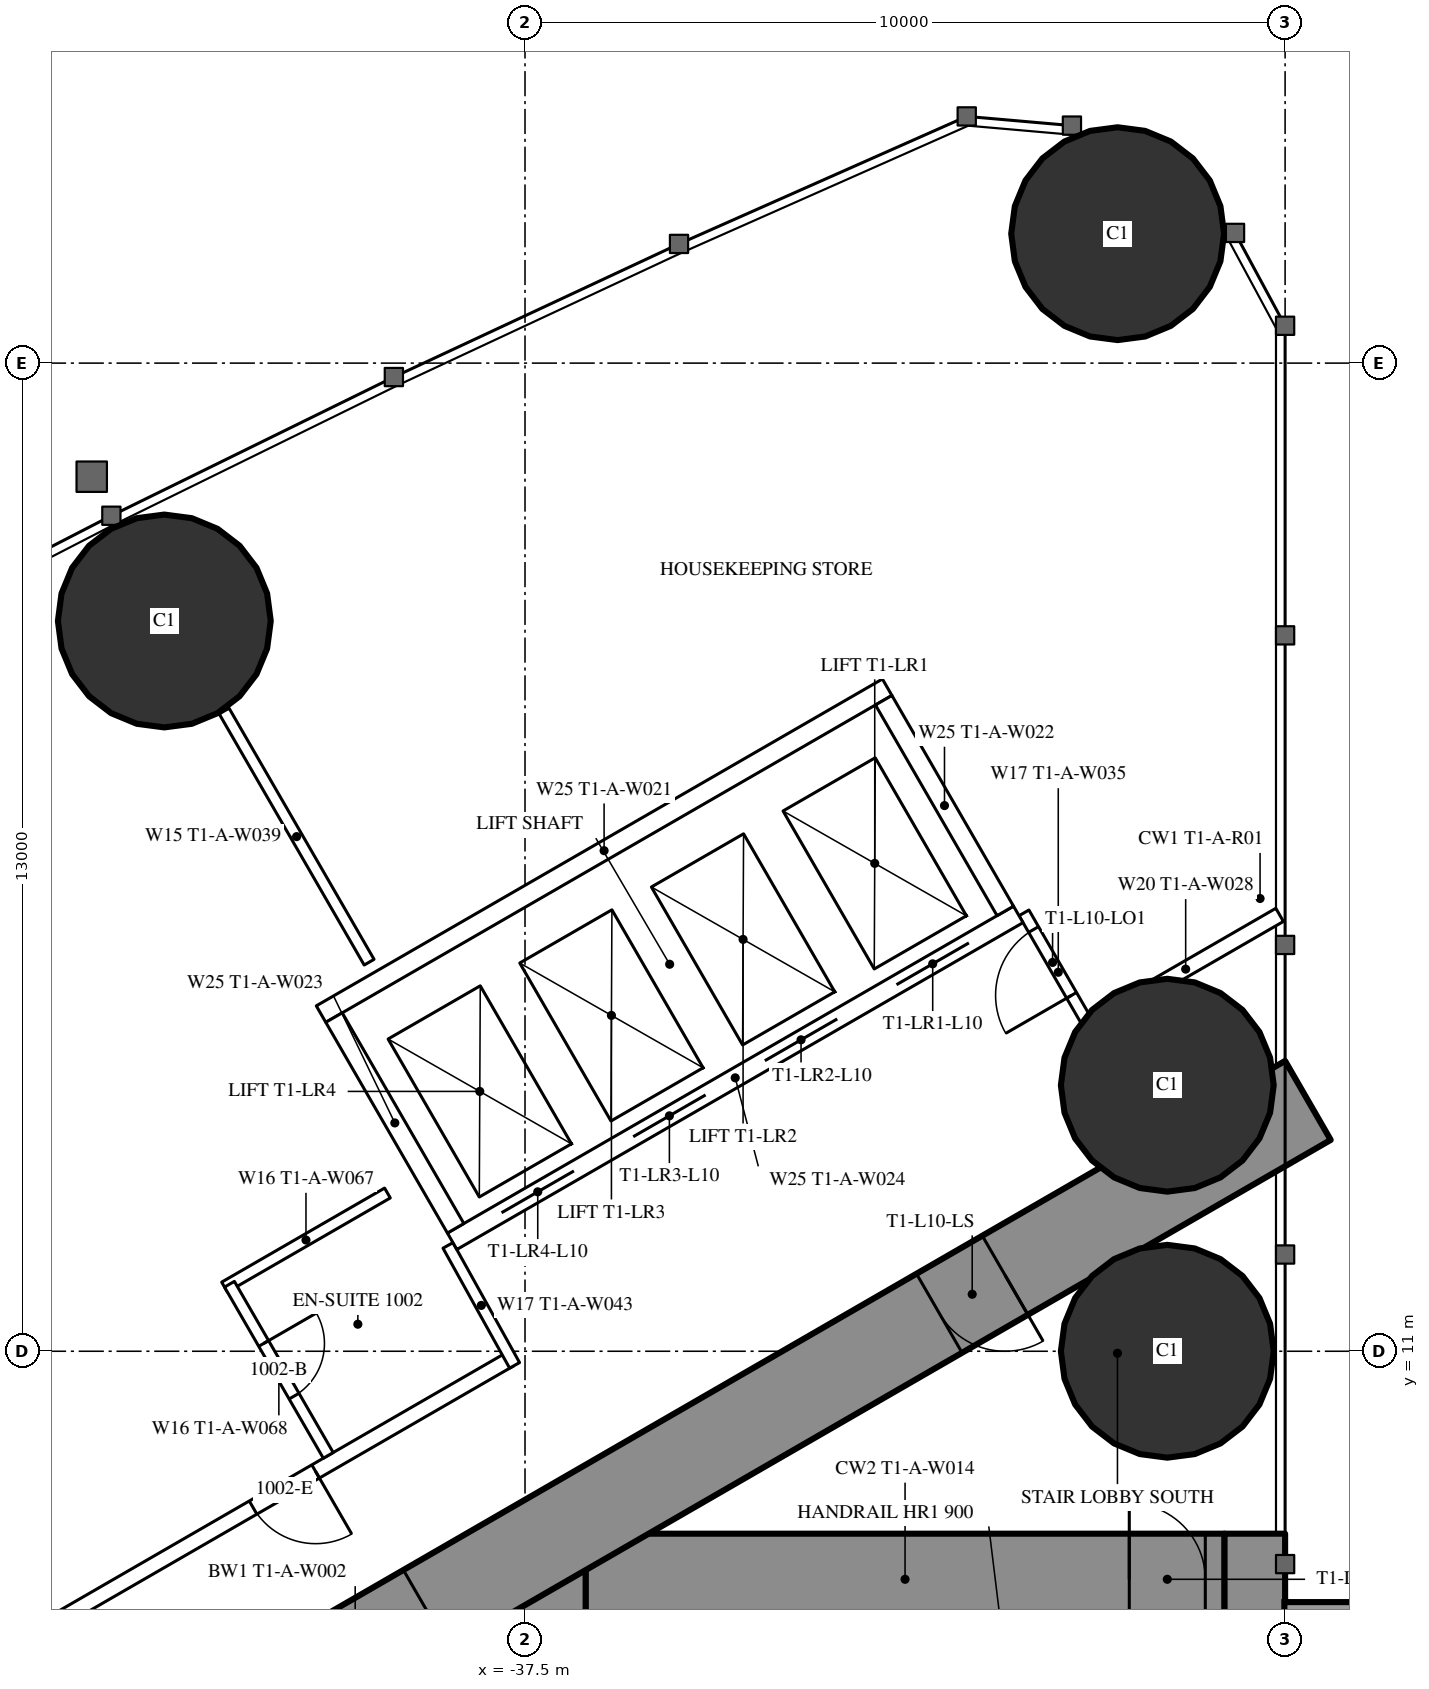
"""IFC4 building model, lengths in metres.
Left out: names, types, materials, properties, quantities, classifications, styles, units other than length and angle.
Written with IfcOpenShell. Run it as: python <this file> out.ifc"""

import sys

from ifc_helpers import new_model, si_unit, direction, frame, frame_2d, origin, origin_2d, place, context, subcontext, project, spatial, rectangle, hollow_circle, extrude, element, fill, save


model = new_model("IFC4")
c1 = context("Model", 3, precision=1e-05, world=origin(), true_north=direction((0.0, 1.0)))
c2 = subcontext(c1, "Body", "Model", "MODEL_VIEW")
j1 = project(units=[si_unit("LENGTHUNIT", "METRE"), si_unit("PLANEANGLEUNIT", "RADIAN")], contexts=[c1])
p1 = place(None, origin())
s1 = spatial("IfcSite", under=j1, at=p1, CompositionType="ELEMENT")
p2 = place(p1, origin())
s2 = spatial("IfcBuilding", under=s1, at=p2, CompositionType="ELEMENT")
p3 = place(p2, frame((0.0, 0.0, 42.5)))
s3 = spatial("IfcBuildingStorey", under=s2, at=p3, CompositionType="ELEMENT", Elevation=42.5)
for number, where, z_axis, x_axis in (
    (1, (-29.703, 25.703, 0.0), (0.0, 0.0, 1.0), (1.0, 0.0, 0.0)),
    (2, (-29.05, 11.0, 0.0), (0.0, 0.0, 1.0), (1.0, 0.0, 0.0)),
    (3, (-29.05, 14.5, 0.0), (0.0, 0.0, 1.0), (1.0, 0.0, 0.0)),
    (4, (-42.245, 20.607, 0.0), (0.0, 0.0, 1.0), (1.0, 0.0, 0.0)),
):
    element("IfcColumn", number, at=place(p3, frame(where, z_axis=z_axis, x_axis=x_axis)), inside=s3, PredefinedType="COLUMN", context=c2, shape_type="SweptSolid", body=[
        extrude(hollow_circle(Radius=1.4, WallThickness=0.12, at=origin_2d()), origin(), (0.0, 0.0, 1.0), 3.5),
    ])
p4 = place(p3, frame((-27.9, 8.6, 0.0), z_axis=(0.0, 0.0, 1.0), x_axis=(0.0, -1.0, 0.0)))
e5 = element("IfcWall", 5, at=p4, inside=s3, PredefinedType="SHEAR", context=c2, shape_type="SweptSolid", body=[
    extrude(rectangle(XDim=17.2, YDim=0.8, at=frame_2d((8.6, 0.0))), origin(), (0.0, 0.0, 1.0), 3.5),
])
p5 = place(p4, frame((2.45, 0.0, 0.6)))
e6 = element("IfcOpeningElement", 6, at=p5, cuts=e5, PredefinedType="OPENING", context=c2, shape_type="SweptSolid", body=[
    extrude(rectangle(XDim=0.6, YDim=2.1, at=frame_2d((0.3, 1.05))), frame((0.0, 0.41, 0.0), z_axis=(0.0, -1.0, 0.0), x_axis=(1.0, 0.0, 0.0)), (0.0, 0.0, 1.0), 0.82),
])
p6 = place(p4, frame((14.15, 0.0, 0.6)))
e7 = element("IfcOpeningElement", 7, at=p6, cuts=e5, PredefinedType="OPENING", context=c2, shape_type="SweptSolid", body=[
    extrude(rectangle(XDim=0.6, YDim=2.1, at=frame_2d((0.3, 1.05))), frame((0.0, 0.41, 0.0), z_axis=(0.0, -1.0, 0.0), x_axis=(1.0, 0.0, 0.0)), (0.0, 0.0, 1.0), 0.82),
])
p7 = place(p3, frame((-37.3, 8.6, 0.0), z_axis=(0.0, 0.0, 1.0), x_axis=(0.0, -1.0, 0.0)))
e8 = element("IfcWall", 8, at=p7, inside=s3, PredefinedType="SHEAR", context=c2, shape_type="SweptSolid", body=[
    extrude(rectangle(XDim=17.2, YDim=1.2, at=frame_2d((8.6, 0.0))), origin(), (0.0, 0.0, 1.0), 3.5),
])
p8 = place(p7, frame((7.7, 0.0, 0.0)))
e9 = element("IfcOpeningElement", 9, at=p8, cuts=e8, PredefinedType="OPENING", context=c2, shape_type="SweptSolid", body=[
    extrude(rectangle(XDim=1.8, YDim=2.2, at=frame_2d((0.9, 1.1))), frame((0.0, 0.61, 0.0), z_axis=(0.0, -1.0, 0.0), x_axis=(1.0, 0.0, 0.0)), (0.0, 0.0, 1.0), 1.22),
])
p9 = place(p3, frame((-28.3, 8.0, 0.0), z_axis=(0.0, 0.0, 1.0), x_axis=(-1.0, 0.0, 0.0)))
e10 = element("IfcWall", 10, at=p9, inside=s3, PredefinedType="SHEAR", context=c2, shape_type="SweptSolid", body=[
    extrude(rectangle(XDim=8.4, YDim=1.2, at=frame_2d((4.2, 0.0))), origin(), (0.0, 0.0, 1.0), 3.5),
])
p10 = place(p9, frame((0.25, 0.0, 0.0)))
e11 = element("IfcOpeningElement", 11, at=p10, cuts=e10, PredefinedType="OPENING", context=c2, shape_type="SweptSolid", body=[
    extrude(rectangle(XDim=1.0, YDim=2.2, at=frame_2d((0.5, 1.1))), frame((0.0, 0.61, 0.0), z_axis=(0.0, -1.0, 0.0), x_axis=(1.0, 0.0, 0.0)), (0.0, 0.0, 1.0), 1.22),
])
p11 = place(p3, frame((-27.2, 14.3, 0.0), z_axis=(0.0, 0.0, 1.0), x_axis=(-0.866026593062, -0.499997940104, 0.0)))
e12 = element("IfcWall", 12, at=p11, inside=s3, PredefinedType="SHEAR", context=c2, shape_type="SweptSolid", body=[
    extrude(rectangle(XDim=28.946, YDim=1.2, at=frame_2d((14.473, 0.0))), origin(), (0.0, 0.0, 1.0), 3.5),
])
p12 = place(p11, frame((4.6, 0.0, 0.0)))
e13 = element("IfcOpeningElement", 13, at=p12, cuts=e12, PredefinedType="OPENING", context=c2, shape_type="SweptSolid", body=[
    extrude(rectangle(XDim=1.0, YDim=2.2, at=frame_2d((0.5, 1.1))), frame((0.0, 0.61, 0.0), z_axis=(0.0, -1.0, 0.0), x_axis=(1.0, 0.0, 0.0)), (0.0, 0.0, 1.0), 1.22),
])
p13 = place(p11, frame((13.395, 0.0, 0.0)))
e14 = element("IfcOpeningElement", 14, at=p13, cuts=e12, PredefinedType="OPENING", context=c2, shape_type="SweptSolid", body=[
    extrude(rectangle(XDim=1.8, YDim=2.2, at=frame_2d((0.9, 1.1))), frame((0.0, 0.61, 0.0), z_axis=(0.0, -1.0, 0.0), x_axis=(1.0, 0.0, 0.0)), (0.0, 0.0, 1.0), 1.22),
])
p14 = place(p3, frame((-39.551, 16.119, 0.0), z_axis=(0.0, 0.0, 1.0), x_axis=(-0.500014214979, 0.866017196607, 0.0)))
e15 = element("IfcWall", 15, at=p14, inside=s3, PredefinedType="PARTITIONING", context=c2, shape_type="SweptSolid", body=[
    extrude(rectangle(XDim=3.815, YDim=0.15, at=frame_2d((1.907, 0.0))), origin(), (0.0, 0.0, 1.0), 3.25),
])
p15 = place(p3, frame((-27.572, 16.741, 0.0), z_axis=(0.0, 0.0, 1.0), x_axis=(-0.866034618596, -0.499984039138, 0.0)))
e16 = element("IfcWall", 16, at=p15, inside=s3, PredefinedType="PARTITIONING", context=c2, shape_type="SweptSolid", body=[
    extrude(rectangle(XDim=2.854, YDim=0.2, at=frame_2d((1.427, 0.0))), origin(), (0.0, 0.0, 1.0), 3.25),
])
p16 = place(p3, frame((-37.7, 10.894, 0.0), z_axis=(0.0, 0.0, 1.0), x_axis=(-0.866027905338, -0.499995667157, 0.0)))
e17 = element("IfcWall", 17, at=p16, inside=s3, PredefinedType="PARTITIONING", context=c2, shape_type="SweptSolid", body=[
    extrude(rectangle(XDim=21.787, YDim=0.2, at=frame_2d((10.894, 0.0))), origin(), (0.0, 0.0, 1.0), 3.25),
])
p17 = place(p16, frame((11.78, 0.0, 0.0)))
e18 = element("IfcOpeningElement", 18, at=p17, cuts=e17, PredefinedType="OPENING", context=c2, shape_type="SweptSolid", body=[
    extrude(rectangle(XDim=0.95, YDim=2.2, at=frame_2d((0.475, 1.1))), frame((0.0, 0.11, 0.0), z_axis=(0.0, -1.0, 0.0), x_axis=(1.0, 0.0, 0.0)), (0.0, 0.0, 1.0), 0.22),
])
p18 = place(p16, frame((2.95, 0.0, 0.0)))
e19 = element("IfcOpeningElement", 19, at=p18, cuts=e17, PredefinedType="OPENING", context=c2, shape_type="SweptSolid", body=[
    extrude(rectangle(XDim=0.95, YDim=2.2, at=frame_2d((0.475, 1.1))), frame((0.0, 0.11, 0.0), z_axis=(0.0, -1.0, 0.0), x_axis=(1.0, 0.0, 0.0)), (0.0, 0.0, 1.0), 0.22),
])
p19 = place(p3, frame((-38.513, 12.392, 0.0), z_axis=(0.0, 0.0, 1.0), x_axis=(0.485585508183, -0.874189175317, 0.0)))
e20 = element("IfcWall", 20, at=p19, inside=s3, PredefinedType="PARTITIONING", context=c2, shape_type="SweptSolid", body=[
    extrude(rectangle(XDim=1.805, YDim=0.15, at=frame_2d((0.902, 0.0))), origin(), (0.0, 0.0, 1.0), 3.25),
])
p20 = place(p3, frame((-30.033, 15.205, 0.0), z_axis=(0.0, 0.0, 1.0), x_axis=(-0.499980071345, 0.866036909293, 0.0)))
e21 = element("IfcWall", 21, at=p20, inside=s3, PredefinedType="PARTITIONING", context=c2, shape_type="SweptSolid", body=[
    extrude(rectangle(XDim=1.805, YDim=0.15, at=frame_2d((0.902, 0.0))), origin(), (0.0, 0.0, 1.0), 3.25),
])
p21 = place(p20, frame((0.552, 0.0, 0.0)))
e22 = element("IfcOpeningElement", 22, at=p21, cuts=e21, PredefinedType="OPENING", context=c2, shape_type="SweptSolid", body=[
    extrude(rectangle(XDim=1.0, YDim=2.2, at=frame_2d((0.5, 1.1))), frame((0.0, 0.085, 0.0), z_axis=(0.0, -1.0, 0.0), x_axis=(1.0, 0.0, 0.0)), (0.0, 0.0, 1.0), 0.17),
])
p22 = place(p3, frame((-39.31, 13.082, 0.0), z_axis=(0.0, 0.0, 1.0), x_axis=(-0.866031185235, -0.4999899861, 0.0)))
e23 = element("IfcWall", 23, at=p22, inside=s3, PredefinedType="PARTITIONING", context=c2, shape_type="SweptSolid", body=[
    extrude(rectangle(XDim=2.475, YDim=0.15, at=frame_2d((1.238, 0.0))), origin(), (0.0, 0.0, 1.0), 3.25),
])
p23 = place(p3, frame((-40.088, 9.63, 0.0), z_axis=(0.0, 0.0, 1.0), x_axis=(-0.500006934395, 0.866021400173, 0.0)))
e24 = element("IfcWall", 24, at=p23, inside=s3, PredefinedType="PARTITIONING", context=c2, shape_type="SweptSolid", body=[
    extrude(rectangle(XDim=2.6, YDim=0.15, at=frame_2d((1.3, 0.0))), origin(), (0.0, 0.0, 1.0), 3.25),
])
p24 = place(p23, frame((0.9, 0.0, 0.0)))
e25 = element("IfcOpeningElement", 25, at=p24, cuts=e24, PredefinedType="OPENING", context=c2, shape_type="SweptSolid", body=[
    extrude(rectangle(XDim=0.8, YDim=2.2, at=frame_2d((0.4, 1.1))), frame((0.0, 0.085, 0.0), z_axis=(0.0, -1.0, 0.0), x_axis=(1.0, 0.0, 0.0)), (0.0, 0.0, 1.0), 0.17),
])
p25 = place(p3, frame((-31.01, 16.747, 0.0), z_axis=(0.0, 0.0, 1.0), x_axis=(-0.866028165386, -0.499995216735, 0.0)))
e26 = element("IfcWall", 26, at=p25, inside=s3, PredefinedType="PARTITIONING", context=c2, shape_type="SweptSolid", body=[
    extrude(rectangle(XDim=8.6, YDim=0.25, at=frame_2d((4.3, 0.0))), origin(), (0.0, 0.0, 1.0), 3.25),
])
p26 = place(p25, frame((0.75, 0.0, 0.0)))
e27 = element("IfcOpeningElement", 27, at=p26, cuts=e26, PredefinedType="OPENING", context=c2, shape_type="SweptSolid", body=[
    extrude(rectangle(XDim=1.1, YDim=2.2, at=frame_2d((0.55, 1.1))), frame((0.0, 0.135, 0.0), z_axis=(0.0, -1.0, 0.0), x_axis=(1.0, 0.0, 0.0)), (0.0, 0.0, 1.0), 0.27),
])
p27 = place(p25, frame((2.75, 0.0, 0.0)))
e28 = element("IfcOpeningElement", 28, at=p27, cuts=e26, PredefinedType="OPENING", context=c2, shape_type="SweptSolid", body=[
    extrude(rectangle(XDim=1.1, YDim=2.2, at=frame_2d((0.55, 1.1))), frame((0.0, 0.135, 0.0), z_axis=(0.0, -1.0, 0.0), x_axis=(1.0, 0.0, 0.0)), (0.0, 0.0, 1.0), 0.27),
])
p28 = place(p25, frame((4.75, 0.0, 0.0)))
e29 = element("IfcOpeningElement", 29, at=p28, cuts=e26, PredefinedType="OPENING", context=c2, shape_type="SweptSolid", body=[
    extrude(rectangle(XDim=1.1, YDim=2.2, at=frame_2d((0.55, 1.1))), frame((0.0, 0.135, 0.0), z_axis=(0.0, -1.0, 0.0), x_axis=(1.0, 0.0, 0.0)), (0.0, 0.0, 1.0), 0.27),
])
p29 = place(p25, frame((6.75, 0.0, 0.0)))
e30 = element("IfcOpeningElement", 30, at=p29, cuts=e26, PredefinedType="OPENING", context=c2, shape_type="SweptSolid", body=[
    extrude(rectangle(XDim=1.1, YDim=2.2, at=frame_2d((0.55, 1.1))), frame((0.0, 0.135, 0.0), z_axis=(0.0, -1.0, 0.0), x_axis=(1.0, 0.0, 0.0)), (0.0, 0.0, 1.0), 0.27),
])
p30 = place(p3, frame((-32.736, 19.736, 0.0), z_axis=(0.0, 0.0, 1.0), x_axis=(-0.866028165386, -0.499995216735, 0.0)))
e31 = element("IfcWall", 31, at=p30, inside=s3, PredefinedType="PARTITIONING", context=c2, shape_type="SweptSolid", body=[
    extrude(rectangle(XDim=8.6, YDim=0.25, at=frame_2d((4.3, 0.0))), origin(), (0.0, 0.0, 1.0), 3.25),
])
p31 = place(p3, frame((-31.181, 16.793, 0.0), z_axis=(0.0, 0.0, 1.0), x_axis=(-0.499929347863, 0.866066190972, 0.0)))
e32 = element("IfcWall", 32, at=p31, inside=s3, PredefinedType="PARTITIONING", context=c2, shape_type="SweptSolid", body=[
    extrude(rectangle(XDim=3.201, YDim=0.25, at=frame_2d((1.6, 0.0))), origin(), (0.0, 0.0, 1.0), 3.25),
])
p32 = place(p3, frame((-38.413, 12.618, 0.0), z_axis=(0.0, 0.0, 1.0), x_axis=(-0.499872130319, 0.866099216793, 0.0)))
e33 = element("IfcWall", 33, at=p32, inside=s3, PredefinedType="PARTITIONING", context=c2, shape_type="SweptSolid", body=[
    extrude(rectangle(XDim=3.2, YDim=0.25, at=frame_2d((1.6, 0.0))), origin(), (0.0, 0.0, 1.0), 3.25),
])
p33 = place(p24, origin())
e34 = element("IfcDoor", 34, at=p33, inside=s3, OperationType="SINGLE_SWING_RIGHT", PredefinedType="DOOR", context=c2, shape_type="SweptSolid", body=[
    extrude(rectangle(XDim=0.8, YDim=2.2, at=frame_2d((0.4, 1.1))), frame((0.0, 0.025, 0.0), z_axis=(0.0, -1.0, 0.0), x_axis=(1.0, 0.0, 0.0)), (0.0, 0.0, 1.0), 0.05),
])
fill(e25, e34)
p34 = place(p18, origin())
e35 = element("IfcDoor", 35, at=p34, inside=s3, OperationType="SINGLE_SWING_LEFT", PredefinedType="DOOR", context=c2, shape_type="SweptSolid", body=[
    extrude(rectangle(XDim=0.95, YDim=2.2, at=frame_2d((0.475, 1.1))), frame((0.0, 0.025, 0.0), z_axis=(0.0, -1.0, 0.0), x_axis=(1.0, 0.0, 0.0)), (0.0, 0.0, 1.0), 0.05),
])
fill(e19, e35)
p35 = place(p21, origin())
e36 = element("IfcDoor", 36, at=p35, inside=s3, OperationType="SINGLE_SWING_LEFT", PredefinedType="DOOR", context=c2, shape_type="SweptSolid", body=[
    extrude(rectangle(XDim=1.0, YDim=2.2, at=frame_2d((0.5, 1.1))), frame((0.0, 0.025, 0.0), z_axis=(0.0, -1.0, 0.0), x_axis=(1.0, 0.0, 0.0)), (0.0, 0.0, 1.0), 0.05),
])
fill(e22, e36)
p36 = place(p12, origin())
e37 = element("IfcDoor", 37, at=p36, inside=s3, OperationType="SINGLE_SWING_LEFT", PredefinedType="DOOR", context=c2, shape_type="SweptSolid", body=[
    extrude(rectangle(XDim=1.0, YDim=2.2, at=frame_2d((0.5, 1.1))), frame((0.0, 0.025, 0.0), z_axis=(0.0, -1.0, 0.0), x_axis=(1.0, 0.0, 0.0)), (0.0, 0.0, 1.0), 0.05),
])
fill(e13, e37)
p37 = place(p13, origin())
e38 = element("IfcDoor", 38, at=p37, inside=s3, OperationType="DOUBLE_DOOR_SINGLE_SWING", PredefinedType="DOOR", context=c2, shape_type="SweptSolid", body=[
    extrude(rectangle(XDim=1.8, YDim=2.2, at=frame_2d((0.9, 1.1))), frame((0.0, 0.025, 0.0), z_axis=(0.0, -1.0, 0.0), x_axis=(1.0, 0.0, 0.0)), (0.0, 0.0, 1.0), 0.05),
])
fill(e14, e38)
p38 = place(p10, origin())
e39 = element("IfcDoor", 39, at=p38, inside=s3, OperationType="SINGLE_SWING_RIGHT", PredefinedType="DOOR", context=c2, shape_type="SweptSolid", body=[
    extrude(rectangle(XDim=1.0, YDim=2.2, at=frame_2d((0.5, 1.1))), frame((0.0, 0.025, 0.0), z_axis=(0.0, -1.0, 0.0), x_axis=(1.0, 0.0, 0.0)), (0.0, 0.0, 1.0), 0.05),
])
fill(e11, e39)
p39 = place(p26, origin())
e40 = element("IfcDoor", 40, at=p39, inside=s3, OperationType="DOUBLE_DOOR_SLIDING", PredefinedType="USERDEFINED", context=c2, shape_type="SweptSolid", body=[
    extrude(rectangle(XDim=1.1, YDim=2.2, at=frame_2d((0.55, 1.1))), frame((0.0, 0.025, 0.0), z_axis=(0.0, -1.0, 0.0), x_axis=(1.0, 0.0, 0.0)), (0.0, 0.0, 1.0), 0.05),
])
fill(e27, e40)
p40 = place(p27, origin())
e41 = element("IfcDoor", 41, at=p40, inside=s3, OperationType="DOUBLE_DOOR_SLIDING", PredefinedType="USERDEFINED", context=c2, shape_type="SweptSolid", body=[
    extrude(rectangle(XDim=1.1, YDim=2.2, at=frame_2d((0.55, 1.1))), frame((0.0, 0.025, 0.0), z_axis=(0.0, -1.0, 0.0), x_axis=(1.0, 0.0, 0.0)), (0.0, 0.0, 1.0), 0.05),
])
fill(e28, e41)
p41 = place(p28, origin())
e42 = element("IfcDoor", 42, at=p41, inside=s3, OperationType="DOUBLE_DOOR_SLIDING", PredefinedType="USERDEFINED", context=c2, shape_type="SweptSolid", body=[
    extrude(rectangle(XDim=1.1, YDim=2.2, at=frame_2d((0.55, 1.1))), frame((0.0, 0.025, 0.0), z_axis=(0.0, -1.0, 0.0), x_axis=(1.0, 0.0, 0.0)), (0.0, 0.0, 1.0), 0.05),
])
fill(e29, e42)
p42 = place(p29, origin())
e43 = element("IfcDoor", 43, at=p42, inside=s3, OperationType="DOUBLE_DOOR_SLIDING", PredefinedType="USERDEFINED", context=c2, shape_type="SweptSolid", body=[
    extrude(rectangle(XDim=1.1, YDim=2.2, at=frame_2d((0.55, 1.1))), frame((0.0, 0.025, 0.0), z_axis=(0.0, -1.0, 0.0), x_axis=(1.0, 0.0, 0.0)), (0.0, 0.0, 1.0), 0.05),
])
fill(e30, e43)
save(model, sys.argv[1])
